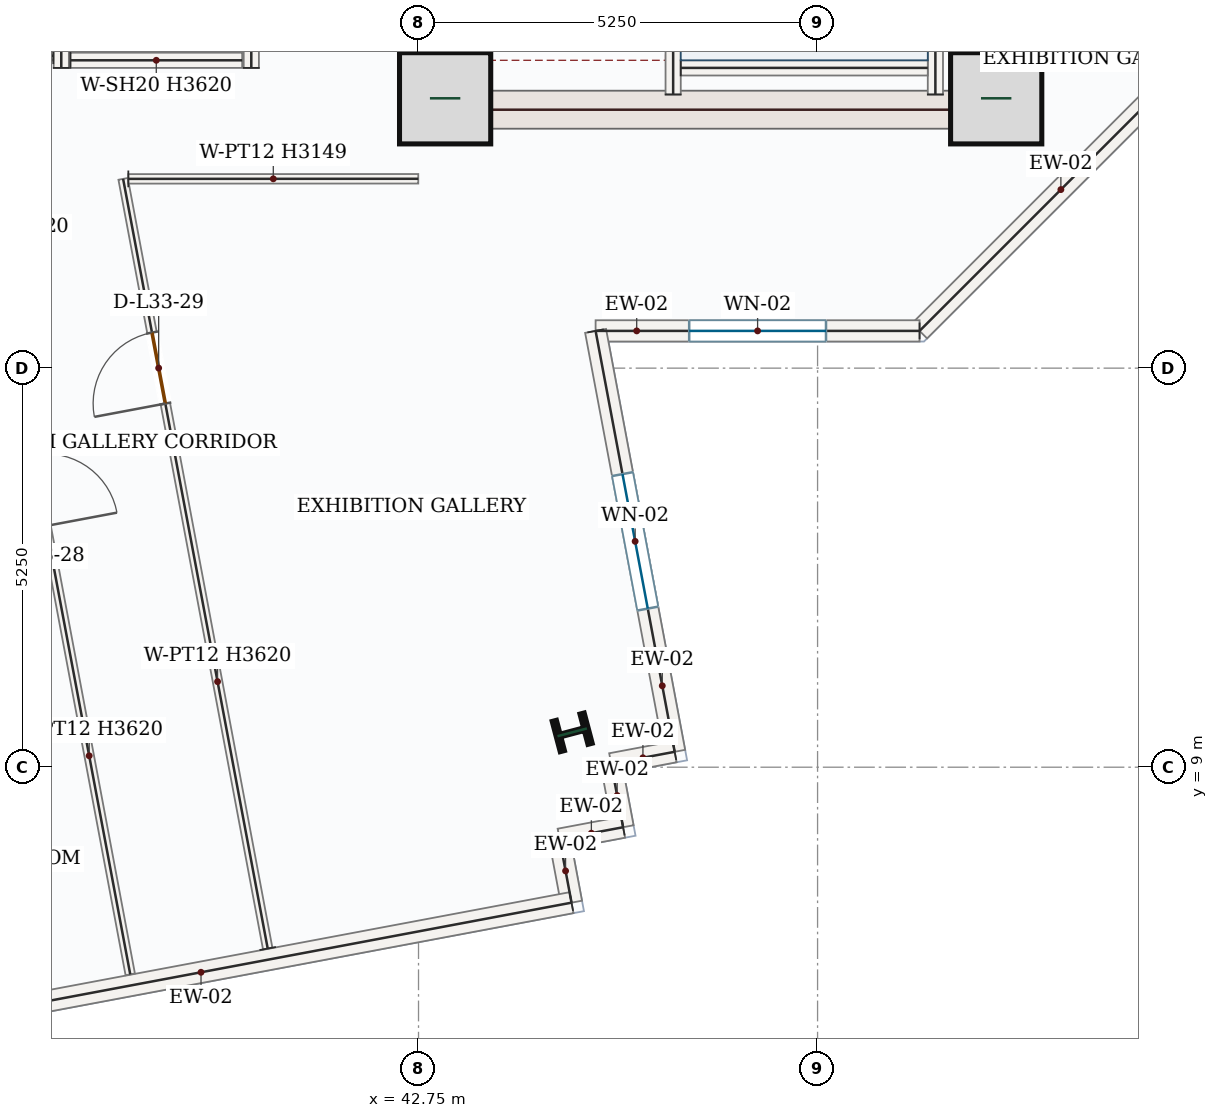
"""IFC4 building model, lengths in metres.
Left out: names, types, materials, properties, quantities, classifications, styles, units other than length and angle.
Written with IfcOpenShell. Run it as: python <this file> out.ifc"""

import sys

from ifc_helpers import new_model, si_unit, direction, frame, frame_2d, origin, origin_2d, place, context, subcontext, project, spatial, rectangle, i_section, extrude, source, transform, mapped, element, fill, save


model = new_model("IFC4")
c1 = context("Model", 3, precision=1e-05, world=origin(), true_north=direction((0.0, 1.0)))
c2 = subcontext(c1, "Body", "Model", "MODEL_VIEW")
j1 = project(units=[si_unit("LENGTHUNIT", "METRE"), si_unit("PLANEANGLEUNIT", "RADIAN")], contexts=[c1])
p1 = place(None, origin())
s1 = spatial("IfcSite", under=j1, at=p1, CompositionType="ELEMENT")
p2 = place(p1, origin())
s2 = spatial("IfcBuilding", under=s1, at=p2, CompositionType="ELEMENT")
p3 = place(p2, frame((0.0, 0.0, 147.3)))
s3 = spatial("IfcBuildingStorey", under=s2, at=p3, CompositionType="ELEMENT", Elevation=147.3)
p4 = place(p3, frame((43.0, 17.4, 0.0), z_axis=(0.0, 0.0, 1.0), x_axis=(0.0, 1.0, 0.0)))
e1 = element("IfcWall", 1, at=p4, inside=s3, PredefinedType="SHEAR", context=c2, shape_type="SweptSolid", body=[
    extrude(rectangle(XDim=8.55, YDim=0.5, at=frame_2d((4.275, 0.0))), origin(), (0.0, 0.0, 1.0), 3.62),
])
p5 = place(p4, frame((6.65, 0.0, 0.0)))
e2 = element("IfcOpeningElement", 2, at=p5, cuts=e1, PredefinedType="OPENING", context=c2, shape_type="SweptSolid", body=[
    extrude(rectangle(XDim=1.1, YDim=2.2, at=frame_2d((0.55, 1.1))), frame((0.0, 0.26, 0.0), z_axis=(0.0, -1.0, 0.0), x_axis=(1.0, 0.0, 0.0)), (0.0, 0.0, 1.0), 0.52),
])
p6 = place(p4, frame((1.75, 0.0, 0.0)))
e3 = element("IfcOpeningElement", 3, at=p6, cuts=e1, PredefinedType="OPENING", context=c2, shape_type="SweptSolid", body=[
    extrude(rectangle(XDim=1.3, YDim=2.2, at=frame_2d((0.65, 1.1))), frame((0.0, 0.26, 0.0), z_axis=(0.0, -1.0, 0.0), x_axis=(1.0, 0.0, 0.0)), (0.0, 0.0, 1.0), 0.52),
])
p7 = place(p4, frame((4.55, 0.0, 0.0)))
e4 = element("IfcOpeningElement", 4, at=p7, cuts=e1, PredefinedType="OPENING", context=c2, shape_type="SweptSolid", body=[
    extrude(rectangle(XDim=0.88, YDim=2.1, at=frame_2d((0.44, 1.05))), frame((0.0, 0.26, 0.0), z_axis=(0.0, -1.0, 0.0), x_axis=(1.0, 0.0, 0.0)), (0.0, 0.0, 1.0), 0.52),
])
m1 = source(origin(), c2, "Body", "SweptSolid", [
    extrude(rectangle(XDim=8.55, YDim=0.5, at=frame_2d((4.275, 0.0))), origin(), (0.0, 0.0, 1.0), 3.62),
])
p8 = place(p3, frame((50.5, 17.4, 0.0), z_axis=(0.0, 0.0, 1.0), x_axis=(0.0, 1.0, 0.0)))
e5 = element("IfcWall", 5, at=p8, inside=s3, PredefinedType="SHEAR", context=c2, shape_type="MappedRepresentation", body=[
    mapped(m1, transform((0.0, 0.0, 0.0), x_axis=(1.0, 0.0, 0.0), y_axis=(0.0, 1.0, 0.0), z_axis=(0.0, 0.0, 1.0), scale=1.0)),
])
m2 = source(origin(), c2, "Body", "SweptSolid", [
    extrude(rectangle(XDim=7.0, YDim=0.5, at=frame_2d((3.5, 0.0))), origin(), (0.0, 0.0, 1.0), 3.62),
])
p9 = place(p3, frame((43.25, 17.65, 0.0), z_axis=(0.0, 0.0, 1.0), x_axis=(1.0, 0.0, 0.0)))
e6 = element("IfcWall", 6, at=p9, inside=s3, PredefinedType="SHEAR", context=c2, shape_type="MappedRepresentation", body=[
    mapped(m2, transform((0.0, 0.0, 0.0), x_axis=(1.0, 0.0, 0.0), y_axis=(0.0, 1.0, 0.0), z_axis=(0.0, 0.0, 1.0), scale=1.0)),
])
m3 = source(origin(), c2, "Body", "SweptSolid", [
    extrude(rectangle(XDim=1.2, YDim=1.2, at=origin_2d()), origin(), (0.0, 0.0, 1.0), 3.9),
])
for number, where, z_axis, x_axis in (
    (7, (43.1, 17.8, 0.0), (0.0, 0.0, 1.0), (1.0, 0.0, 0.0)),
    (8, (50.35, 17.8, 0.0), (0.0, 0.0, 1.0), (1.0, 0.0, 0.0)),
):
    element("IfcColumn", number, at=place(p3, frame(where, z_axis=z_axis, x_axis=x_axis)), inside=s3, PredefinedType="COLUMN", context=c2, shape_type="MappedRepresentation", body=[
        mapped(m3, transform((0.0, 0.0, 0.0), x_axis=(1.0, 0.0, 0.0), y_axis=(0.0, 1.0, 0.0), z_axis=(0.0, 0.0, 1.0), scale=1.0)),
    ])
m4 = source(origin(), c2, "Body", "SweptSolid", [
    extrude(i_section(OverallWidth=0.412, OverallDepth=0.435, WebThickness=0.036, FlangeThickness=0.057, FilletRadius=0.018, at=origin_2d()), origin(), (0.0, 0.0, 1.0), 3.9),
])
p10 = place(p3, frame((44.772, 9.459, 0.0), z_axis=(0.0, 0.0, 1.0), x_axis=(-0.255445757936, 0.966823388604, 0.0)))
e9 = element("IfcColumn", 9, at=p10, inside=s3, PredefinedType="COLUMN", context=c2, shape_type="MappedRepresentation", body=[
    mapped(m4, transform((0.0, 0.0, 0.0), x_axis=(1.0, 0.0, 0.0), y_axis=(0.0, 1.0, 0.0), z_axis=(0.0, 0.0, 1.0), scale=1.0)),
])
m5 = source(origin(), c2, "Body", "SweptSolid", [
    extrude(rectangle(XDim=5.258, YDim=0.28, at=frame_2d((2.629, 0.0))), origin(), (0.0, 0.0, 1.0), 3.62),
])
p11 = place(p3, frame((53.06, 18.458, 0.0), z_axis=(0.0, 0.0, 1.0), x_axis=(-0.707106781187, -0.707106781187, 0.0)))
e10 = element("IfcWall", 10, at=p11, inside=s3, PredefinedType="SOLIDWALL", context=c2, shape_type="MappedRepresentation", body=[
    mapped(m5, transform((0.0, 0.0, 0.0), x_axis=(1.0, 0.0, 0.0), y_axis=(0.0, 1.0, 0.0), z_axis=(0.0, 0.0, 1.0), scale=1.0)),
])
p12 = place(p3, frame((49.342, 14.74, 0.0), z_axis=(0.0, 0.0, 1.0), x_axis=(-1.0, 0.0, 0.0)))
e11 = element("IfcWall", 11, at=p12, inside=s3, PredefinedType="SOLIDWALL", context=c2, shape_type="SweptSolid", body=[
    extrude(rectangle(XDim=4.262, YDim=0.28, at=frame_2d((2.131, 0.0))), origin(), (0.0, 0.0, 1.0), 3.62),
])
p13 = place(p12, frame((1.231, 0.0, 0.85)))
e12 = element("IfcOpeningElement", 12, at=p13, cuts=e11, PredefinedType="OPENING", context=c2, shape_type="SweptSolid", body=[
    extrude(rectangle(XDim=1.8, YDim=1.75, at=frame_2d((0.9, 0.875))), frame((0.0, 0.15, 0.0), z_axis=(0.0, -1.0, 0.0), x_axis=(1.0, 0.0, 0.0)), (0.0, 0.0, 1.0), 0.3),
])
p14 = place(p3, frame((45.08, 14.74, 0.0), z_axis=(0.0, 0.0, 1.0), x_axis=(0.184678339457, -0.982799018587, 0.0)))
e13 = element("IfcWall", 13, at=p14, inside=s3, PredefinedType="SOLIDWALL", context=c2, shape_type="SweptSolid", body=[
    extrude(rectangle(XDim=5.634, YDim=0.28, at=frame_2d((2.817, 0.0))), origin(), (0.0, 0.0, 1.0), 3.62),
])
p15 = place(p14, frame((1.917, 0.0, 0.85)))
e14 = element("IfcOpeningElement", 14, at=p15, cuts=e13, PredefinedType="OPENING", context=c2, shape_type="SweptSolid", body=[
    extrude(rectangle(XDim=1.8, YDim=1.75, at=frame_2d((0.9, 0.875))), frame((0.0, 0.15, 0.0), z_axis=(0.0, -1.0, 0.0), x_axis=(1.0, 0.0, 0.0)), (0.0, 0.0, 1.0), 0.3),
])
m6 = source(origin(), c2, "Body", "SweptSolid", [
    extrude(rectangle(XDim=0.85, YDim=0.28, at=frame_2d((0.425, 0.0))), origin(), (0.0, 0.0, 1.0), 3.62),
])
for number, where, z_axis, x_axis in (
    (15, (46.12, 9.203, 0.0), (0.0, 0.0, 1.0), (-0.983, -0.185, 0.0)),
    (16, (45.285, 9.046, 0.0), (0.0, 0.0, 1.0), (0.185, -0.983, 0.0)),
    (17, (45.442, 8.21, 0.0), (0.0, 0.0, 1.0), (-0.983, -0.185, 0.0)),
    (18, (44.606, 8.053, 0.0), (0.0, 0.0, 1.0), (0.185, -0.983, 0.0)),
):
    element("IfcWall", number, at=place(p3, frame(where, z_axis=z_axis, x_axis=x_axis)), inside=s3, PredefinedType="SOLIDWALL", context=c2, shape_type="MappedRepresentation", body=[
        mapped(m6, transform((0.0, 0.0, 0.0), x_axis=(1.0, 0.0, 0.0), y_axis=(0.0, 1.0, 0.0), z_axis=(0.0, 0.0, 1.0), scale=1.0)),
    ])
m7 = source(origin(), c2, "Body", "SweptSolid", [
    extrude(rectangle(XDim=9.92, YDim=0.28, at=frame_2d((4.96, 0.0))), origin(), (0.0, 0.0, 1.0), 3.62),
])
p16 = place(p3, frame((44.763, 7.218, 0.0), z_axis=(0.0, 0.0, 1.0), x_axis=(-0.982807207568, -0.184634754994, 0.0)))
e19 = element("IfcWall", 19, at=p16, inside=s3, PredefinedType="SOLIDWALL", context=c2, shape_type="MappedRepresentation", body=[
    mapped(m7, transform((0.0, 0.0, 0.0), x_axis=(1.0, 0.0, 0.0), y_axis=(0.0, 1.0, 0.0), z_axis=(0.0, 0.0, 1.0), scale=1.0)),
])
m8 = source(origin(), c2, "Body", "SweptSolid", [
    extrude(rectangle(XDim=7.87, YDim=0.2, at=frame_2d((3.935, 0.0))), origin(), (0.0, 0.0, 1.0), 3.62),
])
p17 = place(p3, frame((49.55, 17.85, 0.0), z_axis=(0.0, 0.0, 1.0), x_axis=(0.0, 1.0, 0.0)))
e20 = element("IfcWall", 20, at=p17, inside=s3, PredefinedType="SOLIDWALL", context=c2, shape_type="MappedRepresentation", body=[
    mapped(m8, transform((0.0, 0.0, 0.0), x_axis=(1.0, 0.0, 0.0), y_axis=(0.0, 1.0, 0.0), z_axis=(0.0, 0.0, 1.0), scale=1.0)),
])
p18 = place(p3, frame((46.1, 17.85, 0.0), z_axis=(0.0, 0.0, 1.0), x_axis=(0.0, 1.0, 0.0)))
e21 = element("IfcWall", 21, at=p18, inside=s3, PredefinedType="SOLIDWALL", context=c2, shape_type="SweptSolid", body=[
    extrude(rectangle(XDim=8.0, YDim=0.2, at=frame_2d((4.0, 0.0))), origin(), (0.0, 0.0, 1.0), 3.62),
])
p19 = place(p18, frame((6.3, 0.0, 0.0)))
e22 = element("IfcOpeningElement", 22, at=p19, cuts=e21, PredefinedType="OPENING", context=c2, shape_type="SweptSolid", body=[
    extrude(rectangle(XDim=1.05, YDim=2.15, at=frame_2d((0.525, 1.075))), frame((0.0, 0.11, 0.0), z_axis=(0.0, -1.0, 0.0), x_axis=(1.0, 0.0, 0.0)), (0.0, 0.0, 1.0), 0.22),
])
m9 = source(origin(), c2, "Body", "SweptSolid", [
    extrude(rectangle(XDim=3.25, YDim=0.2, at=frame_2d((1.625, 0.0))), origin(), (0.0, 0.0, 1.0), 3.62),
])
p20 = place(p3, frame((46.2, 18.2, 0.0), z_axis=(0.0, 0.0, 1.0), x_axis=(1.0, 0.0, 0.0)))
e23 = element("IfcWall", 23, at=p20, inside=s3, PredefinedType="SOLIDWALL", context=c2, shape_type="MappedRepresentation", body=[
    mapped(m9, transform((0.0, 0.0, 0.0), x_axis=(1.0, 0.0, 0.0), y_axis=(0.0, 1.0, 0.0), z_axis=(0.0, 0.0, 1.0), scale=1.0)),
])
m10 = source(origin(), c2, "Body", "SweptSolid", [
    extrude(rectangle(XDim=2.35, YDim=0.2, at=frame_2d((1.175, 0.0))), origin(), (0.0, 0.0, 1.0), 3.62),
])
p21 = place(p3, frame((38.05, 18.2, 0.0), z_axis=(0.0, 0.0, 1.0), x_axis=(0.0, 1.0, 0.0)))
e24 = element("IfcWall", 24, at=p21, inside=s3, PredefinedType="SOLIDWALL", context=c2, shape_type="MappedRepresentation", body=[
    mapped(m10, transform((0.0, 0.0, 0.0), x_axis=(1.0, 0.0, 0.0), y_axis=(0.0, 1.0, 0.0), z_axis=(0.0, 0.0, 1.0), scale=1.0)),
])
p22 = place(p3, frame((40.55, 18.2, 0.0), z_axis=(0.0, 0.0, 1.0), x_axis=(0.0, 1.0, 0.0)))
e25 = element("IfcWall", 25, at=p22, inside=s3, PredefinedType="SOLIDWALL", context=c2, shape_type="SweptSolid", body=[
    extrude(rectangle(XDim=2.35, YDim=0.2, at=frame_2d((1.175, 0.0))), origin(), (0.0, 0.0, 1.0), 3.62),
])
p23 = place(p22, frame((0.625, 0.0, 0.0)))
e26 = element("IfcOpeningElement", 26, at=p23, cuts=e25, PredefinedType="OPENING", context=c2, shape_type="SweptSolid", body=[
    extrude(rectangle(XDim=1.1, YDim=2.15, at=frame_2d((0.55, 1.075))), frame((0.0, 0.11, 0.0), z_axis=(0.0, -1.0, 0.0), x_axis=(1.0, 0.0, 0.0)), (0.0, 0.0, 1.0), 0.22),
])
m11 = source(origin(), c2, "Body", "SweptSolid", [
    extrude(rectangle(XDim=2.26, YDim=0.2, at=frame_2d((1.13, 0.0))), origin(), (0.0, 0.0, 1.0), 3.62),
])
p24 = place(p3, frame((38.17, 18.3, 0.0), z_axis=(0.0, 0.0, 1.0), x_axis=(1.0, 0.0, 0.0)))
e27 = element("IfcWall", 27, at=p24, inside=s3, PredefinedType="SOLIDWALL", context=c2, shape_type="MappedRepresentation", body=[
    mapped(m11, transform((0.0, 0.0, 0.0), x_axis=(1.0, 0.0, 0.0), y_axis=(0.0, 1.0, 0.0), z_axis=(0.0, 0.0, 1.0), scale=1.0)),
])
p25 = place(p3, frame((37.945, 18.36, 0.0), z_axis=(0.0, 0.0, 1.0), x_axis=(-1.0, 0.0, 0.0)))
e28 = element("IfcWall", 28, at=p25, inside=s3, PredefinedType="PARTITIONING", context=c2, shape_type="SweptSolid", body=[
    extrude(rectangle(XDim=3.89, YDim=0.125, at=frame_2d((1.945, 0.0))), origin(), (0.0, 0.0, 1.0), 3.62),
])
p26 = place(p25, frame((1.47, 0.0, 0.0)))
e29 = element("IfcOpeningElement", 29, at=p26, cuts=e28, PredefinedType="OPENING", context=c2, shape_type="SweptSolid", body=[
    extrude(rectangle(XDim=0.95, YDim=2.15, at=frame_2d((0.475, 1.075))), frame((0.0, 0.073, 0.0), z_axis=(0.0, -1.0, 0.0), x_axis=(1.0, 0.0, 0.0)), (0.0, 0.0, 1.0), 0.145),
])
p27 = place(p3, frame((37.361, 14.771, 0.0), z_axis=(0.0, 0.0, 1.0), x_axis=(0.18463806937, -0.982806584908, 0.0)))
e30 = element("IfcWall", 30, at=p27, inside=s3, PredefinedType="PARTITIONING", context=c2, shape_type="SweptSolid", body=[
    extrude(rectangle(XDim=8.645, YDim=0.125, at=frame_2d((4.323, 0.0))), origin(), (0.0, 0.0, 1.0), 3.62),
])
p28 = place(p27, frame((1.693, 0.0, 0.0)))
e31 = element("IfcOpeningElement", 31, at=p28, cuts=e30, PredefinedType="OPENING", context=c2, shape_type="SweptSolid", body=[
    extrude(rectangle(XDim=0.95, YDim=2.15, at=frame_2d((0.475, 1.075))), frame((0.0, 0.073, 0.0), z_axis=(0.0, -1.0, 0.0), x_axis=(1.0, 0.0, 0.0)), (0.0, 0.0, 1.0), 0.145),
])
p29 = place(p3, frame((40.766, 6.615, 0.0), z_axis=(0.0, 0.0, 1.0), x_axis=(-0.184646211839, 0.982805055163, 0.0)))
e32 = element("IfcWall", 32, at=p29, inside=s3, PredefinedType="PARTITIONING", context=c2, shape_type="SweptSolid", body=[
    extrude(rectangle(XDim=10.303, YDim=0.125, at=frame_2d((5.151, 0.0))), origin(), (0.0, 0.0, 1.0), 3.62),
])
p30 = place(p29, frame((7.295, 0.0, 0.0)))
e33 = element("IfcOpeningElement", 33, at=p30, cuts=e32, PredefinedType="OPENING", context=c2, shape_type="SweptSolid", body=[
    extrude(rectangle(XDim=0.95, YDim=2.15, at=frame_2d((0.475, 1.075))), frame((0.0, 0.073, 0.0), z_axis=(0.0, -1.0, 0.0), x_axis=(1.0, 0.0, 0.0)), (0.0, 0.0, 1.0), 0.145),
])
m12 = source(origin(), c2, "Body", "SweptSolid", [
    extrude(rectangle(XDim=3.814, YDim=0.125, at=frame_2d((1.907, 0.0))), origin(), (0.0, 0.0, 1.0), 3.149),
])
p31 = place(p3, frame((38.932, 16.74, 0.0), z_axis=(0.0, 0.0, 1.0), x_axis=(0.999999948787, 0.000320040949, 0.0)))
e34 = element("IfcWall", 34, at=p31, inside=s3, PredefinedType="PARTITIONING", context=c2, shape_type="MappedRepresentation", body=[
    mapped(m12, transform((0.0, 0.0, 0.0), x_axis=(1.0, 0.0, 0.0), y_axis=(0.0, 1.0, 0.0), z_axis=(0.0, 0.0, 1.0), scale=1.0)),
])
m13 = source(origin(), c2, "Body", "SweptSolid", [
    extrude(rectangle(XDim=1.8, YDim=1.75, at=frame_2d((0.9, 0.875))), frame((0.0, 0.03, 0.0), z_axis=(0.0, -1.0, 0.0), x_axis=(1.0, 0.0, 0.0)), (0.0, 0.0, 1.0), 0.06),
])
p32 = place(p13, origin())
e35 = element("IfcWindow", 35, at=p32, inside=s3, PartitioningType="DOUBLE_PANEL_VERTICAL", PredefinedType="WINDOW", context=c2, shape_type="MappedRepresentation", body=[
    mapped(m13, transform((0.0, 0.0, 0.0), x_axis=(1.0, 0.0, 0.0), y_axis=(0.0, 1.0, 0.0), z_axis=(0.0, 0.0, 1.0), scale=1.0)),
])
fill(e12, e35)
p33 = place(p15, origin())
e36 = element("IfcWindow", 36, at=p33, inside=s3, PartitioningType="DOUBLE_PANEL_VERTICAL", PredefinedType="WINDOW", context=c2, shape_type="MappedRepresentation", body=[
    mapped(m13, transform((0.0, 0.0, 0.0), x_axis=(1.0, 0.0, 0.0), y_axis=(0.0, 1.0, 0.0), z_axis=(0.0, 0.0, 1.0), scale=1.0)),
])
fill(e14, e36)
m14 = source(origin(), c2, "Body", "SweptSolid", [
    extrude(rectangle(XDim=0.95, YDim=2.15, at=frame_2d((0.475, 1.075))), frame((0.0, 0.025, 0.0), z_axis=(0.0, -1.0, 0.0), x_axis=(1.0, 0.0, 0.0)), (0.0, 0.0, 1.0), 0.05),
])
p34 = place(p30, origin())
e37 = element("IfcDoor", 37, at=p34, inside=s3, OperationType="SINGLE_SWING_LEFT", PredefinedType="DOOR", context=c2, shape_type="MappedRepresentation", body=[
    mapped(m14, transform((0.0, 0.0, 0.0), x_axis=(1.0, 0.0, 0.0), y_axis=(0.0, 1.0, 0.0), z_axis=(0.0, 0.0, 1.0), scale=1.0)),
])
fill(e33, e37)
save(model, sys.argv[1])
